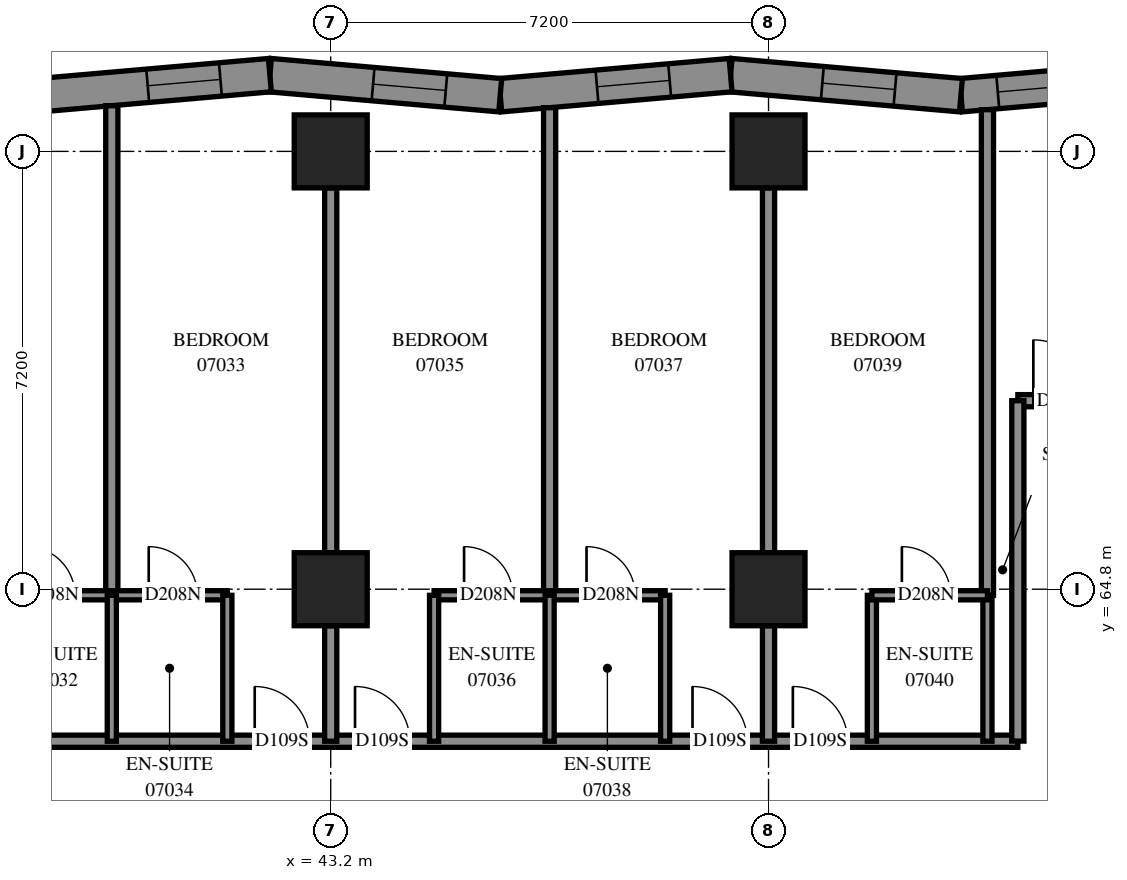
"""IFC4 building model, lengths in metres.
Left out: names, types, materials, properties, quantities, classifications, styles, units other than length and angle.
Written with IfcOpenShell. Run it as: python <this file> out.ifc"""

import sys

from ifc_helpers import new_model, si_unit, direction, frame, frame_2d, origin, origin_2d, place, context, subcontext, project, spatial, polyline, rectangle, outline, extrude, element, fill, save


model = new_model("IFC4")
c1 = context("Model", 3, precision=1e-05, world=origin(), true_north=direction((0.0, 1.0)))
c2 = subcontext(c1, "Body", "Model", "MODEL_VIEW")
j1 = project(units=[si_unit("LENGTHUNIT", "METRE"), si_unit("PLANEANGLEUNIT", "RADIAN")], contexts=[c1])
p1 = place(None, origin())
s1 = spatial("IfcSite", under=j1, at=p1, CompositionType="ELEMENT")
p2 = place(p1, origin())
s2 = spatial("IfcBuilding", under=s1, at=p2, CompositionType="ELEMENT")
p3 = place(p2, frame((0.0, 0.0, 30.4)))
s3 = spatial("IfcBuildingStorey", under=s2, at=p3, CompositionType="ELEMENT", Elevation=30.4)
for number, where, z_axis, x_axis in (
    (1, (43.2, 64.8, 0.0), (0.0, 0.0, 1.0), (1.0, 0.0, 0.0)),
    (2, (43.2, 72.0, 0.0), (0.0, 0.0, 1.0), (1.0, 0.0, 0.0)),
    (3, (50.4, 64.8, 0.0), (0.0, 0.0, 1.0), (1.0, 0.0, 0.0)),
    (4, (50.4, 72.0, 0.0), (0.0, 0.0, 1.0), (1.0, 0.0, 0.0)),
):
    element("IfcColumn", number, at=place(p3, frame(where, z_axis=z_axis, x_axis=x_axis)), inside=s3, PredefinedType="COLUMN", context=c2, shape_type="SweptSolid", body=[
        extrude(rectangle(XDim=1.2, YDim=1.2, at=origin_2d()), origin(), (0.0, 0.0, 1.0), 3.1),
    ])
p4 = place(p3, frame((57.353, 73.254, 0.0), z_axis=(0.0, 0.0, 1.0), x_axis=(-0.9962273538, -0.0867816769, 0.0)))
e5 = element("IfcWall", 5, at=p4, inside=s3, PredefinedType="SOLIDWALL", context=c2, shape_type="SweptSolid", body=[
    extrude(outline(polyline([(-0.024, -0.275), (3.779, -0.275), (3.827, 0.275), (0.024, 0.275), (-0.024, -0.275)])), origin(), (0.0, 0.0, 1.0), 3.1),
])
p5 = place(p4, frame((0.395, 0.0, 0.5)))
e6 = element("IfcOpeningElement", 6, at=p5, cuts=e5, PredefinedType="OPENING", context=c2, shape_type="SweptSolid", body=[
    extrude(rectangle(XDim=2.8, YDim=2.45, at=frame_2d((1.4, 1.225))), frame((0.0, 0.285, 0.0), z_axis=(0.0, -1.0, 0.0), x_axis=(1.0, 0.0, 0.0)), (0.0, 0.0, 1.0), 0.57),
])
p6 = place(p3, frame((53.564, 72.924, 0.0), z_axis=(0.0, 0.0, 1.0), x_axis=(-0.9962271558, 0.0867839505, 0.0)))
e7 = element("IfcWall", 7, at=p6, inside=s3, PredefinedType="SOLIDWALL", context=c2, shape_type="SweptSolid", body=[
    extrude(outline(polyline([(0.024, -0.275), (3.827, -0.275), (3.779, 0.275), (-0.024, 0.275), (0.024, -0.275)])), origin(), (0.0, 0.0, 1.0), 3.1),
])
p7 = place(p6, frame((1.088, 0.0, 0.5)))
e8 = element("IfcOpeningElement", 8, at=p7, cuts=e7, PredefinedType="OPENING", context=c2, shape_type="SweptSolid", body=[
    extrude(rectangle(XDim=1.2, YDim=2.45, at=frame_2d((0.6, 1.225))), frame((0.0, 0.285, 0.0), z_axis=(0.0, -1.0, 0.0), x_axis=(1.0, 0.0, 0.0)), (0.0, 0.0, 1.0), 0.57),
])
p8 = place(p3, frame((49.776, 73.254, 0.0), z_axis=(0.0, 0.0, 1.0), x_axis=(-0.9962273538, -0.0867816769, 0.0)))
e9 = element("IfcWall", 9, at=p8, inside=s3, PredefinedType="SOLIDWALL", context=c2, shape_type="SweptSolid", body=[
    extrude(outline(polyline([(-0.024, -0.275), (3.779, -0.275), (3.827, 0.275), (0.024, 0.275), (-0.024, -0.275)])), origin(), (0.0, 0.0, 1.0), 3.1),
])
p9 = place(p8, frame((1.006, 0.0, 0.5)))
e10 = element("IfcOpeningElement", 10, at=p9, cuts=e9, PredefinedType="OPENING", context=c2, shape_type="SweptSolid", body=[
    extrude(rectangle(XDim=1.2, YDim=2.45, at=frame_2d((0.6, 1.225))), frame((0.0, 0.285, 0.0), z_axis=(0.0, -1.0, 0.0), x_axis=(1.0, 0.0, 0.0)), (0.0, 0.0, 1.0), 0.57),
])
p10 = place(p3, frame((45.988, 72.924, 0.0), z_axis=(0.0, 0.0, 1.0), x_axis=(-0.9962273538, 0.0867816769, 0.0)))
e11 = element("IfcWall", 11, at=p10, inside=s3, PredefinedType="SOLIDWALL", context=c2, shape_type="SweptSolid", body=[
    extrude(outline(polyline([(0.024, -0.275), (3.827, -0.275), (3.779, 0.275), (-0.024, 0.275), (0.024, -0.275)])), origin(), (0.0, 0.0, 1.0), 3.1),
])
p11 = place(p10, frame((0.899, 0.0, 0.5)))
e12 = element("IfcOpeningElement", 12, at=p11, cuts=e11, PredefinedType="OPENING", context=c2, shape_type="SweptSolid", body=[
    extrude(rectangle(XDim=1.2, YDim=2.45, at=frame_2d((0.6, 1.225))), frame((0.0, 0.285, 0.0), z_axis=(0.0, -1.0, 0.0), x_axis=(1.0, 0.0, 0.0)), (0.0, 0.0, 1.0), 0.57),
])
p12 = place(p3, frame((42.2, 73.254, 0.0), z_axis=(0.0, 0.0, 1.0), x_axis=(-0.9962273538, -0.0867816769, 0.0)))
e13 = element("IfcWall", 13, at=p12, inside=s3, PredefinedType="SOLIDWALL", context=c2, shape_type="SweptSolid", body=[
    extrude(outline(polyline([(-0.024, -0.275), (3.779, -0.275), (3.827, 0.275), (0.024, 0.275), (-0.024, -0.275)])), origin(), (0.0, 0.0, 1.0), 3.1),
])
p13 = place(p12, frame((0.817, 0.0, 0.5)))
e14 = element("IfcOpeningElement", 14, at=p13, cuts=e13, PredefinedType="OPENING", context=c2, shape_type="SweptSolid", body=[
    extrude(rectangle(XDim=1.2, YDim=2.45, at=frame_2d((0.6, 1.225))), frame((0.0, 0.285, 0.0), z_axis=(0.0, -1.0, 0.0), x_axis=(1.0, 0.0, 0.0)), (0.0, 0.0, 1.0), 0.57),
])
p14 = place(p3, frame((33.502, 62.3, 0.0), z_axis=(0.0, 0.0, 1.0), x_axis=(1.0, 0.0, 0.0)))
e15 = element("IfcWall", 15, at=p14, inside=s3, PredefinedType="PARTITIONING", context=c2, shape_type="SweptSolid", body=[
    extrude(rectangle(XDim=20.998, YDim=0.2, at=frame_2d((10.499, 0.0))), origin(), (0.0, 0.0, 1.0), 3.1),
])
p15 = place(p14, frame((2.898, 0.0, 0.0)))
e16 = element("IfcOpeningElement", 16, at=p15, cuts=e15, PredefinedType="OPENING", context=c2, shape_type="SweptSolid", body=[
    extrude(rectangle(XDim=0.9, YDim=2.1, at=frame_2d((0.45, 1.05))), frame((0.0, 0.11, 0.0), z_axis=(0.0, -1.0, 0.0), x_axis=(1.0, 0.0, 0.0)), (0.0, 0.0, 1.0), 0.22),
])
p16 = place(p14, frame((8.448, 0.0, 0.0)))
e17 = element("IfcOpeningElement", 17, at=p16, cuts=e15, PredefinedType="OPENING", context=c2, shape_type="SweptSolid", body=[
    extrude(rectangle(XDim=0.9, YDim=2.1, at=frame_2d((0.45, 1.05))), frame((0.0, 0.11, 0.0), z_axis=(0.0, -1.0, 0.0), x_axis=(1.0, 0.0, 0.0)), (0.0, 0.0, 1.0), 0.22),
])
p17 = place(p14, frame((10.098, 0.0, 0.0)))
e18 = element("IfcOpeningElement", 18, at=p17, cuts=e15, PredefinedType="OPENING", context=c2, shape_type="SweptSolid", body=[
    extrude(rectangle(XDim=0.9, YDim=2.1, at=frame_2d((0.45, 1.05))), frame((0.0, 0.11, 0.0), z_axis=(0.0, -1.0, 0.0), x_axis=(1.0, 0.0, 0.0)), (0.0, 0.0, 1.0), 0.22),
])
p18 = place(p14, frame((15.648, 0.0, 0.0)))
e19 = element("IfcOpeningElement", 19, at=p18, cuts=e15, PredefinedType="OPENING", context=c2, shape_type="SweptSolid", body=[
    extrude(rectangle(XDim=0.9, YDim=2.1, at=frame_2d((0.45, 1.05))), frame((0.0, 0.11, 0.0), z_axis=(0.0, -1.0, 0.0), x_axis=(1.0, 0.0, 0.0)), (0.0, 0.0, 1.0), 0.22),
])
p19 = place(p14, frame((17.298, 0.0, 0.0)))
e20 = element("IfcOpeningElement", 20, at=p19, cuts=e15, PredefinedType="OPENING", context=c2, shape_type="SweptSolid", body=[
    extrude(rectangle(XDim=0.9, YDim=2.1, at=frame_2d((0.45, 1.05))), frame((0.0, 0.11, 0.0), z_axis=(0.0, -1.0, 0.0), x_axis=(1.0, 0.0, 0.0)), (0.0, 0.0, 1.0), 0.22),
])
p20 = place(p3, frame((54.5, 67.9, 0.0), z_axis=(0.0, 0.0, 1.0), x_axis=(1.0, 0.0, 0.0)))
e21 = element("IfcWall", 21, at=p20, inside=s3, PredefinedType="PARTITIONING", context=c2, shape_type="SweptSolid", body=[
    extrude(rectangle(XDim=20.6, YDim=0.2, at=frame_2d((10.3, 0.0))), origin(), (0.0, 0.0, 1.0), 3.1),
])
p21 = place(p20, frame((0.255, 0.0, 0.0)))
e22 = element("IfcOpeningElement", 22, at=p21, cuts=e21, PredefinedType="OPENING", context=c2, shape_type="SweptSolid", body=[
    extrude(rectangle(XDim=1.0, YDim=2.1, at=frame_2d((0.5, 1.05))), frame((0.0, 0.11, 0.0), z_axis=(0.0, -1.0, 0.0), x_axis=(1.0, 0.0, 0.0)), (0.0, 0.0, 1.0), 0.22),
])
p22 = place(p20, frame((19.345, 0.0, 0.0)))
e23 = element("IfcOpeningElement", 23, at=p22, cuts=e21, PredefinedType="OPENING", context=c2, shape_type="SweptSolid", body=[
    extrude(rectangle(XDim=1.0, YDim=2.1, at=frame_2d((0.5, 1.05))), frame((0.0, 0.11, 0.0), z_axis=(0.0, -1.0, 0.0), x_axis=(1.0, 0.0, 0.0)), (0.0, 0.0, 1.0), 0.22),
])
p23 = place(p20, frame((5.45, 0.0, 0.0)))
e24 = element("IfcOpeningElement", 24, at=p23, cuts=e21, PredefinedType="OPENING", context=c2, shape_type="SweptSolid", body=[
    extrude(rectangle(XDim=0.9, YDim=2.1, at=frame_2d((0.45, 1.05))), frame((0.0, 0.11, 0.0), z_axis=(0.0, -1.0, 0.0), x_axis=(1.0, 0.0, 0.0)), (0.0, 0.0, 1.0), 0.22),
])
p24 = place(p20, frame((7.1, 0.0, 0.0)))
e25 = element("IfcOpeningElement", 25, at=p24, cuts=e21, PredefinedType="OPENING", context=c2, shape_type="SweptSolid", body=[
    extrude(rectangle(XDim=0.9, YDim=2.1, at=frame_2d((0.45, 1.05))), frame((0.0, 0.11, 0.0), z_axis=(0.0, -1.0, 0.0), x_axis=(1.0, 0.0, 0.0)), (0.0, 0.0, 1.0), 0.22),
])
p25 = place(p20, frame((12.65, 0.0, 0.0)))
e26 = element("IfcOpeningElement", 26, at=p25, cuts=e21, PredefinedType="OPENING", context=c2, shape_type="SweptSolid", body=[
    extrude(rectangle(XDim=0.9, YDim=2.1, at=frame_2d((0.45, 1.05))), frame((0.0, 0.11, 0.0), z_axis=(0.0, -1.0, 0.0), x_axis=(1.0, 0.0, 0.0)), (0.0, 0.0, 1.0), 0.22),
])
p26 = place(p20, frame((14.3, 0.0, 0.0)))
e27 = element("IfcOpeningElement", 27, at=p26, cuts=e21, PredefinedType="OPENING", context=c2, shape_type="SweptSolid", body=[
    extrude(rectangle(XDim=0.9, YDim=2.1, at=frame_2d((0.45, 1.05))), frame((0.0, 0.11, 0.0), z_axis=(0.0, -1.0, 0.0), x_axis=(1.0, 0.0, 0.0)), (0.0, 0.0, 1.0), 0.22),
])
p27 = place(p3, frame((39.6, 64.7, 0.0), z_axis=(0.0, 0.0, 1.0), x_axis=(0.0, 1.0, 0.0)))
e28 = element("IfcWall", 28, at=p27, inside=s3, PredefinedType="PARTITIONING", context=c2, shape_type="SweptSolid", body=[
    extrude(rectangle(XDim=8.052, YDim=0.2, at=frame_2d((4.026, 0.0))), origin(), (0.0, 0.0, 1.0), 3.1),
])
p28 = place(p3, frame((46.8, 64.7, 0.0), z_axis=(0.0, 0.0, 1.0), x_axis=(0.0, 1.0, 0.0)))
e29 = element("IfcWall", 29, at=p28, inside=s3, PredefinedType="PARTITIONING", context=c2, shape_type="SweptSolid", body=[
    extrude(rectangle(XDim=8.019, YDim=0.2, at=frame_2d((4.009, 0.0))), origin(), (0.0, 0.0, 1.0), 3.1),
])
p29 = place(p3, frame((54.0, 64.7, 0.0), z_axis=(0.0, 0.0, 1.0), x_axis=(0.0, 1.0, 0.0)))
e30 = element("IfcWall", 30, at=p29, inside=s3, PredefinedType="PARTITIONING", context=c2, shape_type="SweptSolid", body=[
    extrude(rectangle(XDim=7.986, YDim=0.2, at=frame_2d((3.993, 0.0))), origin(), (0.0, 0.0, 1.0), 3.1),
])
for number, where, z_axis, x_axis in (
    (31, (43.2, 65.4, 0.0), (0.0, 0.0, 1.0), (0.0, 1.0, 0.0)),
    (32, (50.4, 65.4, 0.0), (0.0, 0.0, 1.0), (0.0, 1.0, 0.0)),
):
    element("IfcWall", number, at=place(p3, frame(where, z_axis=z_axis, x_axis=x_axis)), inside=s3, PredefinedType="PARTITIONING", context=c2, shape_type="SweptSolid", body=[
        extrude(rectangle(XDim=6.0, YDim=0.2, at=frame_2d((3.0, 0.0))), origin(), (0.0, 0.0, 1.0), 3.1),
    ])
p30 = place(p3, frame((54.5, 62.302, 0.0), z_axis=(0.0, 0.0, 1.0), x_axis=(0.0, 1.0, 0.0)))
e33 = element("IfcWall", 33, at=p30, inside=s3, PredefinedType="PARTITIONING", context=c2, shape_type="SweptSolid", body=[
    extrude(rectangle(XDim=5.598, YDim=0.2, at=frame_2d((2.799, 0.0))), origin(), (0.0, 0.0, 1.0), 3.1),
])
p31 = place(p3, frame((44.9, 64.7, 0.0), z_axis=(0.0, 0.0, 1.0), x_axis=(1.0, 0.0, 0.0)))
e34 = element("IfcWall", 34, at=p31, inside=s3, PredefinedType="PARTITIONING", context=c2, shape_type="SweptSolid", body=[
    extrude(rectangle(XDim=3.8, YDim=0.15, at=frame_2d((1.9, 0.0))), origin(), (0.0, 0.0, 1.0), 3.1),
])
p32 = place(p31, frame((0.493, 0.0, 0.0)))
e35 = element("IfcOpeningElement", 35, at=p32, cuts=e34, PredefinedType="OPENING", context=c2, shape_type="SweptSolid", body=[
    extrude(rectangle(XDim=0.8, YDim=2.1, at=frame_2d((0.4, 1.05))), frame((0.0, 0.085, 0.0), z_axis=(0.0, -1.0, 0.0), x_axis=(1.0, 0.0, 0.0)), (0.0, 0.0, 1.0), 0.17),
])
p33 = place(p31, frame((2.507, 0.0, 0.0)))
e36 = element("IfcOpeningElement", 36, at=p33, cuts=e34, PredefinedType="OPENING", context=c2, shape_type="SweptSolid", body=[
    extrude(rectangle(XDim=0.8, YDim=2.1, at=frame_2d((0.4, 1.05))), frame((0.0, 0.085, 0.0), z_axis=(0.0, -1.0, 0.0), x_axis=(1.0, 0.0, 0.0)), (0.0, 0.0, 1.0), 0.17),
])
p34 = place(p3, frame((37.7, 64.7, 0.0), z_axis=(0.0, 0.0, 1.0), x_axis=(1.0, 0.0, 0.0)))
e37 = element("IfcWall", 37, at=p34, inside=s3, PredefinedType="PARTITIONING", context=c2, shape_type="SweptSolid", body=[
    extrude(rectangle(XDim=3.8, YDim=0.15, at=frame_2d((1.9, 0.0))), origin(), (0.0, 0.0, 1.0), 3.1),
])
p35 = place(p34, frame((0.493, 0.0, 0.0)))
e38 = element("IfcOpeningElement", 38, at=p35, cuts=e37, PredefinedType="OPENING", context=c2, shape_type="SweptSolid", body=[
    extrude(rectangle(XDim=0.8, YDim=2.1, at=frame_2d((0.4, 1.05))), frame((0.0, 0.085, 0.0), z_axis=(0.0, -1.0, 0.0), x_axis=(1.0, 0.0, 0.0)), (0.0, 0.0, 1.0), 0.17),
])
p36 = place(p34, frame((2.507, 0.0, 0.0)))
e39 = element("IfcOpeningElement", 39, at=p36, cuts=e37, PredefinedType="OPENING", context=c2, shape_type="SweptSolid", body=[
    extrude(rectangle(XDim=0.8, YDim=2.1, at=frame_2d((0.4, 1.05))), frame((0.0, 0.085, 0.0), z_axis=(0.0, -1.0, 0.0), x_axis=(1.0, 0.0, 0.0)), (0.0, 0.0, 1.0), 0.17),
])
for number, where, z_axis, x_axis in (
    (40, (39.6, 62.3, 0.0), (0.0, 0.0, 1.0), (0.0, 1.0, 0.0)),
    (41, (41.5, 62.3, 0.0), (0.0, 0.0, 1.0), (0.0, 1.0, 0.0)),
    (42, (44.9, 62.3, 0.0), (0.0, 0.0, 1.0), (0.0, 1.0, 0.0)),
    (43, (46.8, 62.3, 0.0), (0.0, 0.0, 1.0), (0.0, 1.0, 0.0)),
    (44, (48.7, 62.3, 0.0), (0.0, 0.0, 1.0), (0.0, 1.0, 0.0)),
    (45, (52.1, 62.3, 0.0), (0.0, 0.0, 1.0), (0.0, 1.0, 0.0)),
    (46, (54.0, 62.3, 0.0), (0.0, 0.0, 1.0), (0.0, 1.0, 0.0)),
):
    element("IfcWall", number, at=place(p3, frame(where, z_axis=z_axis, x_axis=x_axis)), inside=s3, PredefinedType="PARTITIONING", context=c2, shape_type="SweptSolid", body=[
        extrude(rectangle(XDim=2.4, YDim=0.15, at=frame_2d((1.2, 0.0))), origin(), (0.0, 0.0, 1.0), 3.1),
    ])
for number, where, z_axis, x_axis in (
    (47, (43.2, 62.3, 0.0), (0.0, 0.0, 1.0), (0.0, 1.0, 0.0)),
    (48, (50.4, 62.3, 0.0), (0.0, 0.0, 1.0), (0.0, 1.0, 0.0)),
):
    element("IfcWall", number, at=place(p3, frame(where, z_axis=z_axis, x_axis=x_axis)), inside=s3, PredefinedType="PARTITIONING", context=c2, shape_type="SweptSolid", body=[
        extrude(rectangle(XDim=1.9, YDim=0.2, at=frame_2d((0.95, 0.0))), origin(), (0.0, 0.0, 1.0), 3.1),
    ])
p37 = place(p3, frame((52.1, 64.7, 0.0), z_axis=(0.0, 0.0, 1.0), x_axis=(1.0, 0.0, 0.0)))
e49 = element("IfcWall", 49, at=p37, inside=s3, PredefinedType="PARTITIONING", context=c2, shape_type="SweptSolid", body=[
    extrude(rectangle(XDim=1.9, YDim=0.15, at=frame_2d((0.95, 0.0))), origin(), (0.0, 0.0, 1.0), 3.1),
])
p38 = place(p37, frame((0.493, 0.0, 0.0)))
e50 = element("IfcOpeningElement", 50, at=p38, cuts=e49, PredefinedType="OPENING", context=c2, shape_type="SweptSolid", body=[
    extrude(rectangle(XDim=0.8, YDim=2.1, at=frame_2d((0.4, 1.05))), frame((0.0, 0.085, 0.0), z_axis=(0.0, -1.0, 0.0), x_axis=(1.0, 0.0, 0.0)), (0.0, 0.0, 1.0), 0.17),
])
p39 = place(p5, origin())
e51 = element("IfcWindow", 51, at=p39, inside=s3, PartitioningType="SINGLE_PANEL", PredefinedType="WINDOW", context=c2, shape_type="SweptSolid", body=[
    extrude(rectangle(XDim=2.8, YDim=2.45, at=frame_2d((1.4, 1.225))), frame((0.0, 0.155, 0.0), z_axis=(0.0, -1.0, 0.0), x_axis=(1.0, 0.0, 0.0)), (0.0, 0.0, 1.0), 0.06),
])
fill(e6, e51)
p40 = place(p7, origin())
e52 = element("IfcWindow", 52, at=p40, inside=s3, PartitioningType="SINGLE_PANEL", PredefinedType="WINDOW", context=c2, shape_type="SweptSolid", body=[
    extrude(rectangle(XDim=1.2, YDim=2.45, at=frame_2d((0.6, 1.225))), frame((0.0, 0.155, 0.0), z_axis=(0.0, -1.0, 0.0), x_axis=(1.0, 0.0, 0.0)), (0.0, 0.0, 1.0), 0.06),
])
fill(e8, e52)
p41 = place(p9, origin())
e53 = element("IfcWindow", 53, at=p41, inside=s3, PartitioningType="SINGLE_PANEL", PredefinedType="WINDOW", context=c2, shape_type="SweptSolid", body=[
    extrude(rectangle(XDim=1.2, YDim=2.45, at=frame_2d((0.6, 1.225))), frame((0.0, 0.155, 0.0), z_axis=(0.0, -1.0, 0.0), x_axis=(1.0, 0.0, 0.0)), (0.0, 0.0, 1.0), 0.06),
])
fill(e10, e53)
p42 = place(p11, origin())
e54 = element("IfcWindow", 54, at=p42, inside=s3, PartitioningType="SINGLE_PANEL", PredefinedType="WINDOW", context=c2, shape_type="SweptSolid", body=[
    extrude(rectangle(XDim=1.2, YDim=2.45, at=frame_2d((0.6, 1.225))), frame((0.0, 0.155, 0.0), z_axis=(0.0, -1.0, 0.0), x_axis=(1.0, 0.0, 0.0)), (0.0, 0.0, 1.0), 0.06),
])
fill(e12, e54)
p43 = place(p13, origin())
e55 = element("IfcWindow", 55, at=p43, inside=s3, PartitioningType="SINGLE_PANEL", PredefinedType="WINDOW", context=c2, shape_type="SweptSolid", body=[
    extrude(rectangle(XDim=1.2, YDim=2.45, at=frame_2d((0.6, 1.225))), frame((0.0, 0.155, 0.0), z_axis=(0.0, -1.0, 0.0), x_axis=(1.0, 0.0, 0.0)), (0.0, 0.0, 1.0), 0.06),
])
fill(e14, e55)
p44 = place(p35, origin())
e56 = element("IfcDoor", 56, at=p44, inside=s3, OperationType="SINGLE_SWING_RIGHT", PredefinedType="DOOR", context=c2, shape_type="SweptSolid", body=[
    extrude(rectangle(XDim=0.8, YDim=2.1, at=frame_2d((0.4, 1.05))), frame((0.0, 0.025, 0.0), z_axis=(0.0, -1.0, 0.0), x_axis=(1.0, 0.0, 0.0)), (0.0, 0.0, 1.0), 0.05),
])
fill(e38, e56)
p45 = place(p16, origin())
e57 = element("IfcDoor", 57, at=p45, inside=s3, OperationType="SINGLE_SWING_LEFT", PredefinedType="DOOR", context=c2, shape_type="SweptSolid", body=[
    extrude(rectangle(XDim=0.9, YDim=2.1, at=frame_2d((0.45, 1.05))), frame((0.0, 0.025, 0.0), z_axis=(0.0, -1.0, 0.0), x_axis=(1.0, 0.0, 0.0)), (0.0, 0.0, 1.0), 0.05),
])
fill(e17, e57)
p46 = place(p36, origin())
e58 = element("IfcDoor", 58, at=p46, inside=s3, OperationType="SINGLE_SWING_RIGHT", PredefinedType="DOOR", context=c2, shape_type="SweptSolid", body=[
    extrude(rectangle(XDim=0.8, YDim=2.1, at=frame_2d((0.4, 1.05))), frame((0.0, 0.025, 0.0), z_axis=(0.0, -1.0, 0.0), x_axis=(1.0, 0.0, 0.0)), (0.0, 0.0, 1.0), 0.05),
])
fill(e39, e58)
p47 = place(p17, origin())
e59 = element("IfcDoor", 59, at=p47, inside=s3, OperationType="SINGLE_SWING_RIGHT", PredefinedType="DOOR", context=c2, shape_type="SweptSolid", body=[
    extrude(rectangle(XDim=0.9, YDim=2.1, at=frame_2d((0.45, 1.05))), frame((0.0, 0.025, 0.0), z_axis=(0.0, -1.0, 0.0), x_axis=(1.0, 0.0, 0.0)), (0.0, 0.0, 1.0), 0.05),
])
fill(e18, e59)
p48 = place(p32, origin())
e60 = element("IfcDoor", 60, at=p48, inside=s3, OperationType="SINGLE_SWING_RIGHT", PredefinedType="DOOR", context=c2, shape_type="SweptSolid", body=[
    extrude(rectangle(XDim=0.8, YDim=2.1, at=frame_2d((0.4, 1.05))), frame((0.0, 0.025, 0.0), z_axis=(0.0, -1.0, 0.0), x_axis=(1.0, 0.0, 0.0)), (0.0, 0.0, 1.0), 0.05),
])
fill(e35, e60)
p49 = place(p18, origin())
e61 = element("IfcDoor", 61, at=p49, inside=s3, OperationType="SINGLE_SWING_LEFT", PredefinedType="DOOR", context=c2, shape_type="SweptSolid", body=[
    extrude(rectangle(XDim=0.9, YDim=2.1, at=frame_2d((0.45, 1.05))), frame((0.0, 0.025, 0.0), z_axis=(0.0, -1.0, 0.0), x_axis=(1.0, 0.0, 0.0)), (0.0, 0.0, 1.0), 0.05),
])
fill(e19, e61)
p50 = place(p33, origin())
e62 = element("IfcDoor", 62, at=p50, inside=s3, OperationType="SINGLE_SWING_RIGHT", PredefinedType="DOOR", context=c2, shape_type="SweptSolid", body=[
    extrude(rectangle(XDim=0.8, YDim=2.1, at=frame_2d((0.4, 1.05))), frame((0.0, 0.025, 0.0), z_axis=(0.0, -1.0, 0.0), x_axis=(1.0, 0.0, 0.0)), (0.0, 0.0, 1.0), 0.05),
])
fill(e36, e62)
p51 = place(p19, origin())
e63 = element("IfcDoor", 63, at=p51, inside=s3, OperationType="SINGLE_SWING_RIGHT", PredefinedType="DOOR", context=c2, shape_type="SweptSolid", body=[
    extrude(rectangle(XDim=0.9, YDim=2.1, at=frame_2d((0.45, 1.05))), frame((0.0, 0.025, 0.0), z_axis=(0.0, -1.0, 0.0), x_axis=(1.0, 0.0, 0.0)), (0.0, 0.0, 1.0), 0.05),
])
fill(e20, e63)
p52 = place(p38, origin())
e64 = element("IfcDoor", 64, at=p52, inside=s3, OperationType="SINGLE_SWING_RIGHT", PredefinedType="DOOR", context=c2, shape_type="SweptSolid", body=[
    extrude(rectangle(XDim=0.8, YDim=2.1, at=frame_2d((0.4, 1.05))), frame((0.0, 0.025, 0.0), z_axis=(0.0, -1.0, 0.0), x_axis=(1.0, 0.0, 0.0)), (0.0, 0.0, 1.0), 0.05),
])
fill(e50, e64)
p53 = place(p21, origin())
e65 = element("IfcDoor", 65, at=p53, inside=s3, OperationType="SINGLE_SWING_LEFT", PredefinedType="DOOR", context=c2, shape_type="SweptSolid", body=[
    extrude(rectangle(XDim=1.0, YDim=2.1, at=frame_2d((0.5, 1.05))), frame((0.0, 0.025, 0.0), z_axis=(0.0, -1.0, 0.0), x_axis=(1.0, 0.0, 0.0)), (0.0, 0.0, 1.0), 0.05),
])
fill(e22, e65)
save(model, sys.argv[1])
